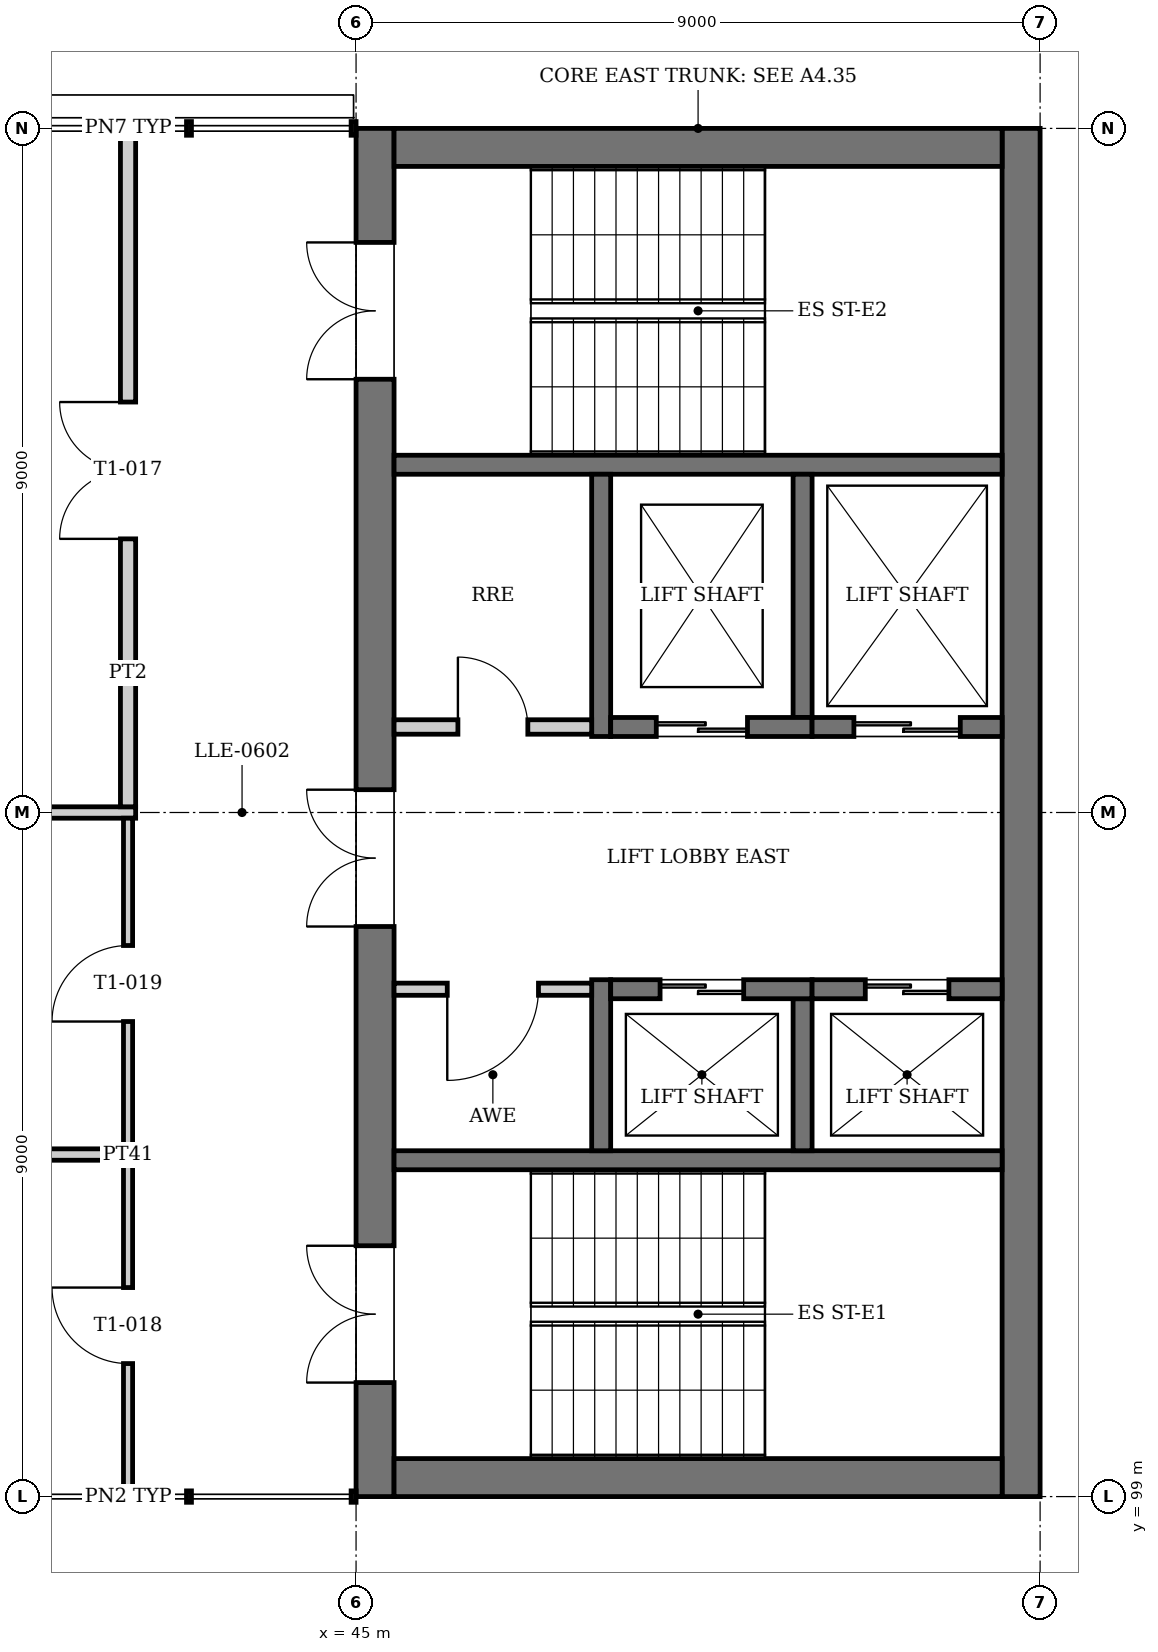
"""IFC4 building model, lengths in metres.
Left out: names, types, materials, properties, quantities, classifications, styles, units other than length and angle.
Written with IfcOpenShell. Run it as: python <this file> out.ifc"""

import sys

from ifc_helpers import new_model, si_unit, direction, frame, frame_2d, origin, place, context, subcontext, project, spatial, rectangle, extrude, element, fill, save


model = new_model("IFC4")
c1 = context("Model", 3, precision=1e-05, world=origin(), true_north=direction((0.0, 1.0)))
c2 = subcontext(c1, "Body", "Model", "MODEL_VIEW")
j1 = project(units=[si_unit("LENGTHUNIT", "METRE"), si_unit("PLANEANGLEUNIT", "RADIAN")], contexts=[c1])
p1 = place(None, origin())
s1 = spatial("IfcSite", under=j1, at=p1, CompositionType="ELEMENT")
p2 = place(p1, origin())
s2 = spatial("IfcBuilding", under=s1, at=p2, CompositionType="ELEMENT")
p3 = place(p2, frame((0.0, 0.0, 27.2)))
s3 = spatial("IfcBuildingStorey", under=s2, at=p3, CompositionType="ELEMENT", Elevation=27.2)
p4 = place(p3, frame((45.25, 99.0, 0.0), z_axis=(0.0, 0.0, 1.0), x_axis=(0.0, 1.0, 0.0)))
e1 = element("IfcWall", 1, at=p4, inside=s3, PredefinedType="SHEAR", context=c2, shape_type="SweptSolid", body=[
    extrude(rectangle(XDim=18.0, YDim=0.5, at=frame_2d((9.0, 0.0))), origin(), (0.0, 0.0, 1.0), 4.0),
])
p5 = place(p4, frame((1.5, 0.0, 0.0)))
e2 = element("IfcOpeningElement", 2, at=p5, cuts=e1, PredefinedType="OPENING", context=c2, shape_type="SweptSolid", body=[
    extrude(rectangle(XDim=1.8, YDim=2.1, at=frame_2d((0.9, 1.05))), frame((0.0, 0.26, 0.0), z_axis=(0.0, -1.0, 0.0), x_axis=(1.0, 0.0, 0.0)), (0.0, 0.0, 1.0), 0.52),
])
p6 = place(p4, frame((14.7, 0.0, 0.0)))
e3 = element("IfcOpeningElement", 3, at=p6, cuts=e1, PredefinedType="OPENING", context=c2, shape_type="SweptSolid", body=[
    extrude(rectangle(XDim=1.8, YDim=2.1, at=frame_2d((0.9, 1.05))), frame((0.0, 0.26, 0.0), z_axis=(0.0, -1.0, 0.0), x_axis=(1.0, 0.0, 0.0)), (0.0, 0.0, 1.0), 0.52),
])
p7 = place(p4, frame((7.5, 0.0, 0.0)))
e4 = element("IfcOpeningElement", 4, at=p7, cuts=e1, PredefinedType="OPENING", context=c2, shape_type="SweptSolid", body=[
    extrude(rectangle(XDim=1.8, YDim=2.1, at=frame_2d((0.9, 1.05))), frame((0.0, 0.26, 0.0), z_axis=(0.0, -1.0, 0.0), x_axis=(1.0, 0.0, 0.0)), (0.0, 0.0, 1.0), 0.52),
])
p8 = place(p3, frame((53.75, 99.0, 0.0), z_axis=(0.0, 0.0, 1.0), x_axis=(0.0, 1.0, 0.0)))
e5 = element("IfcWall", 5, at=p8, inside=s3, PredefinedType="SHEAR", context=c2, shape_type="SweptSolid", body=[
    extrude(rectangle(XDim=18.0, YDim=0.5, at=frame_2d((9.0, 0.0))), origin(), (0.0, 0.0, 1.0), 4.0),
])
for number, where, z_axis, x_axis in (
    (6, (45.5, 99.25, 0.0), (0.0, 0.0, 1.0), (1.0, 0.0, 0.0)),
    (7, (45.5, 116.75, 0.0), (0.0, 0.0, 1.0), (1.0, 0.0, 0.0)),
):
    element("IfcWall", number, at=place(p3, frame(where, z_axis=z_axis, x_axis=x_axis)), inside=s3, PredefinedType="SHEAR", context=c2, shape_type="SweptSolid", body=[
        extrude(rectangle(XDim=8.0, YDim=0.5, at=frame_2d((4.0, 0.0))), origin(), (0.0, 0.0, 1.0), 4.0),
    ])
for number, where, z_axis, x_axis in (
    (8, (45.5, 103.425, 0.0), (0.0, 0.0, 1.0), (1.0, 0.0, 0.0)),
    (9, (45.5, 112.575, 0.0), (0.0, 0.0, 1.0), (1.0, 0.0, 0.0)),
):
    element("IfcWall", number, at=place(p3, frame(where, z_axis=z_axis, x_axis=x_axis)), inside=s3, PredefinedType="SOLIDWALL", context=c2, shape_type="SweptSolid", body=[
        extrude(rectangle(XDim=8.0, YDim=0.25, at=frame_2d((4.0, 0.0))), origin(), (0.0, 0.0, 1.0), 3.75),
    ])
p9 = place(p3, frame((48.225, 103.55, 0.0), z_axis=(0.0, 0.0, 1.0), x_axis=(0.0, 1.0, 0.0)))
e10 = element("IfcWall", 10, at=p9, inside=s3, PredefinedType="SOLIDWALL", context=c2, shape_type="SweptSolid", body=[
    extrude(rectangle(XDim=2.25, YDim=0.25, at=frame_2d((1.125, 0.0))), origin(), (0.0, 0.0, 1.0), 4.0),
])
p10 = place(p3, frame((50.875, 103.55, 0.0), z_axis=(0.0, 0.0, 1.0), x_axis=(0.0, 1.0, 0.0)))
e11 = element("IfcWall", 11, at=p10, inside=s3, PredefinedType="SOLIDWALL", context=c2, shape_type="SweptSolid", body=[
    extrude(rectangle(XDim=2.0, YDim=0.25, at=frame_2d((1.0, 0.0))), origin(), (0.0, 0.0, 1.0), 4.0),
])
p11 = place(p3, frame((48.35, 105.675, 0.0), z_axis=(0.0, 0.0, 1.0), x_axis=(1.0, 0.0, 0.0)))
e12 = element("IfcWall", 12, at=p11, inside=s3, PredefinedType="SOLIDWALL", context=c2, shape_type="SweptSolid", body=[
    extrude(rectangle(XDim=2.65, YDim=0.25, at=frame_2d((1.325, 0.0))), origin(), (0.0, 0.0, 1.0), 4.0),
])
p12 = place(p11, frame((0.65, 0.0, 0.0)))
e13 = element("IfcOpeningElement", 13, at=p12, cuts=e12, PredefinedType="OPENING", context=c2, shape_type="SweptSolid", body=[
    extrude(rectangle(XDim=1.1, YDim=2.1, at=frame_2d((0.55, 1.05))), frame((0.0, 0.135, 0.0), z_axis=(0.0, -1.0, 0.0), x_axis=(1.0, 0.0, 0.0)), (0.0, 0.0, 1.0), 0.27),
])
p13 = place(p3, frame((51.0, 105.675, 0.0), z_axis=(0.0, 0.0, 1.0), x_axis=(1.0, 0.0, 0.0)))
e14 = element("IfcWall", 14, at=p13, inside=s3, PredefinedType="SOLIDWALL", context=c2, shape_type="SweptSolid", body=[
    extrude(rectangle(XDim=2.5, YDim=0.25, at=frame_2d((1.25, 0.0))), origin(), (0.0, 0.0, 1.0), 4.0),
])
p14 = place(p13, frame((0.7, 0.0, 0.0)))
e15 = element("IfcOpeningElement", 15, at=p14, cuts=e14, PredefinedType="OPENING", context=c2, shape_type="SweptSolid", body=[
    extrude(rectangle(XDim=1.1, YDim=2.1, at=frame_2d((0.55, 1.05))), frame((0.0, 0.135, 0.0), z_axis=(0.0, -1.0, 0.0), x_axis=(1.0, 0.0, 0.0)), (0.0, 0.0, 1.0), 0.27),
])
p15 = place(p3, frame((48.225, 109.0, 0.0), z_axis=(0.0, 0.0, 1.0), x_axis=(0.0, 1.0, 0.0)))
e16 = element("IfcWall", 16, at=p15, inside=s3, PredefinedType="SOLIDWALL", context=c2, shape_type="SweptSolid", body=[
    extrude(rectangle(XDim=3.45, YDim=0.25, at=frame_2d((1.725, 0.0))), origin(), (0.0, 0.0, 1.0), 4.0),
])
p16 = place(p3, frame((50.875, 109.25, 0.0), z_axis=(0.0, 0.0, 1.0), x_axis=(0.0, 1.0, 0.0)))
e17 = element("IfcWall", 17, at=p16, inside=s3, PredefinedType="SOLIDWALL", context=c2, shape_type="SweptSolid", body=[
    extrude(rectangle(XDim=3.2, YDim=0.25, at=frame_2d((1.6, 0.0))), origin(), (0.0, 0.0, 1.0), 4.0),
])
p17 = place(p3, frame((48.35, 109.125, 0.0), z_axis=(0.0, 0.0, 1.0), x_axis=(1.0, 0.0, 0.0)))
e18 = element("IfcWall", 18, at=p17, inside=s3, PredefinedType="SOLIDWALL", context=c2, shape_type="SweptSolid", body=[
    extrude(rectangle(XDim=2.65, YDim=0.25, at=frame_2d((1.325, 0.0))), origin(), (0.0, 0.0, 1.0), 4.0),
])
p18 = place(p17, frame((0.6, 0.0, 0.0)))
e19 = element("IfcOpeningElement", 19, at=p18, cuts=e18, PredefinedType="OPENING", context=c2, shape_type="SweptSolid", body=[
    extrude(rectangle(XDim=1.2, YDim=2.1, at=frame_2d((0.6, 1.05))), frame((0.0, 0.135, 0.0), z_axis=(0.0, -1.0, 0.0), x_axis=(1.0, 0.0, 0.0)), (0.0, 0.0, 1.0), 0.27),
])
p19 = place(p3, frame((51.0, 109.125, 0.0), z_axis=(0.0, 0.0, 1.0), x_axis=(1.0, 0.0, 0.0)))
e20 = element("IfcWall", 20, at=p19, inside=s3, PredefinedType="SOLIDWALL", context=c2, shape_type="SweptSolid", body=[
    extrude(rectangle(XDim=2.5, YDim=0.25, at=frame_2d((1.25, 0.0))), origin(), (0.0, 0.0, 1.0), 4.0),
])
p20 = place(p19, frame((0.55, 0.0, 0.0)))
e21 = element("IfcOpeningElement", 21, at=p20, cuts=e20, PredefinedType="OPENING", context=c2, shape_type="SweptSolid", body=[
    extrude(rectangle(XDim=1.4, YDim=2.4, at=frame_2d((0.7, 1.2))), frame((0.0, 0.135, 0.0), z_axis=(0.0, -1.0, 0.0), x_axis=(1.0, 0.0, 0.0)), (0.0, 0.0, 1.0), 0.27),
])
p21 = place(p3, frame((45.5, 105.675, 0.0), z_axis=(0.0, 0.0, 1.0), x_axis=(1.0, 0.0, 0.0)))
e22 = element("IfcWall", 22, at=p21, inside=s3, PredefinedType="PARTITIONING", context=c2, shape_type="SweptSolid", body=[
    extrude(rectangle(XDim=2.6, YDim=0.16, at=frame_2d((1.3, 0.0))), origin(), (0.0, 0.0, 1.0), 3.75),
])
p22 = place(p21, frame((0.7, 0.0, 0.0)))
e23 = element("IfcOpeningElement", 23, at=p22, cuts=e22, PredefinedType="OPENING", context=c2, shape_type="SweptSolid", body=[
    extrude(rectangle(XDim=1.2, YDim=2.1, at=frame_2d((0.6, 1.05))), frame((0.0, 0.09, 0.0), z_axis=(0.0, -1.0, 0.0), x_axis=(1.0, 0.0, 0.0)), (0.0, 0.0, 1.0), 0.18),
])
p23 = place(p3, frame((45.5, 109.125, 0.0), z_axis=(0.0, 0.0, 1.0), x_axis=(1.0, 0.0, 0.0)))
e24 = element("IfcWall", 24, at=p23, inside=s3, PredefinedType="PARTITIONING", context=c2, shape_type="SweptSolid", body=[
    extrude(rectangle(XDim=2.6, YDim=0.19, at=frame_2d((1.3, 0.0))), origin(), (0.0, 0.0, 1.0), 3.75),
])
p24 = place(p23, frame((0.84, 0.0, 0.0)))
e25 = element("IfcOpeningElement", 25, at=p24, cuts=e24, PredefinedType="OPENING", context=c2, shape_type="SweptSolid", body=[
    extrude(rectangle(XDim=0.92, YDim=2.1, at=frame_2d((0.46, 1.05))), frame((0.0, 0.105, 0.0), z_axis=(0.0, -1.0, 0.0), x_axis=(1.0, 0.0, 0.0)), (0.0, 0.0, 1.0), 0.21),
])
p25 = place(p3, frame((32.925, 103.5, 0.0), z_axis=(0.0, 0.0, 1.0), x_axis=(1.0, 0.0, 0.0)))
e26 = element("IfcWall", 26, at=p25, inside=s3, PredefinedType="PARTITIONING", context=c2, shape_type="SweptSolid", body=[
    extrude(rectangle(XDim=9.015, YDim=0.15, at=frame_2d((4.507, 0.0))), origin(), (0.0, 0.0, 1.0), 3.05),
])
p26 = place(p3, frame((32.925, 108.0, 0.0), z_axis=(0.0, 0.0, 1.0), x_axis=(1.0, 0.0, 0.0)))
e27 = element("IfcWall", 27, at=p26, inside=s3, PredefinedType="PARTITIONING", context=c2, shape_type="SweptSolid", body=[
    extrude(rectangle(XDim=9.175, YDim=0.15, at=frame_2d((4.587, 0.0))), origin(), (0.0, 0.0, 1.0), 3.05),
])
p27 = place(p3, frame((42.0, 99.075, 0.0), z_axis=(0.0, 0.0, 1.0), x_axis=(0.0, 1.0, 0.0)))
e28 = element("IfcWall", 28, at=p27, inside=s3, PredefinedType="PARTITIONING", context=c2, shape_type="SweptSolid", body=[
    extrude(rectangle(XDim=8.85, YDim=0.12, at=frame_2d((4.425, 0.0))), origin(), (0.0, 0.0, 1.0), 3.85),
])
p28 = place(p27, frame((1.675, 0.0, 0.0)))
e29 = element("IfcOpeningElement", 29, at=p28, cuts=e28, PredefinedType="OPENING", context=c2, shape_type="SweptSolid", body=[
    extrude(rectangle(XDim=1.0, YDim=2.1, at=frame_2d((0.5, 1.05))), frame((0.0, 0.07, 0.0), z_axis=(0.0, -1.0, 0.0), x_axis=(1.0, 0.0, 0.0)), (0.0, 0.0, 1.0), 0.14),
])
p29 = place(p27, frame((6.175, 0.0, 0.0)))
e30 = element("IfcOpeningElement", 30, at=p29, cuts=e28, PredefinedType="OPENING", context=c2, shape_type="SweptSolid", body=[
    extrude(rectangle(XDim=1.0, YDim=2.1, at=frame_2d((0.5, 1.05))), frame((0.0, 0.07, 0.0), z_axis=(0.0, -1.0, 0.0), x_axis=(1.0, 0.0, 0.0)), (0.0, 0.0, 1.0), 0.14),
])
p30 = place(p3, frame((42.0, 108.075, 0.0), z_axis=(0.0, 0.0, 1.0), x_axis=(0.0, 1.0, 0.0)))
e31 = element("IfcWall", 31, at=p30, inside=s3, PredefinedType="PARTITIONING", context=c2, shape_type="SweptSolid", body=[
    extrude(rectangle(XDim=8.835, YDim=0.2, at=frame_2d((4.417, 0.0))), origin(), (0.0, 0.0, 1.0), 3.85),
])
p31 = place(p30, frame((3.525, 0.0, 0.0)))
e32 = element("IfcOpeningElement", 32, at=p31, cuts=e31, PredefinedType="OPENING", context=c2, shape_type="SweptSolid", body=[
    extrude(rectangle(XDim=1.8, YDim=2.1, at=frame_2d((0.9, 1.05))), frame((0.0, 0.11, 0.0), z_axis=(0.0, -1.0, 0.0), x_axis=(1.0, 0.0, 0.0)), (0.0, 0.0, 1.0), 0.22),
])
p32 = place(p12, origin())
e33 = element("IfcDoor", 33, at=p32, inside=s3, OperationType="DOUBLE_DOOR_SLIDING", PredefinedType="DOOR", context=c2, shape_type="SweptSolid", body=[
    extrude(rectangle(XDim=1.1, YDim=2.1, at=frame_2d((0.55, 1.05))), frame((0.0, 0.025, 0.0), z_axis=(0.0, -1.0, 0.0), x_axis=(1.0, 0.0, 0.0)), (0.0, 0.0, 1.0), 0.05),
])
fill(e13, e33)
p33 = place(p14, origin())
e34 = element("IfcDoor", 34, at=p33, inside=s3, OperationType="DOUBLE_DOOR_SLIDING", PredefinedType="DOOR", context=c2, shape_type="SweptSolid", body=[
    extrude(rectangle(XDim=1.1, YDim=2.1, at=frame_2d((0.55, 1.05))), frame((0.0, 0.025, 0.0), z_axis=(0.0, -1.0, 0.0), x_axis=(1.0, 0.0, 0.0)), (0.0, 0.0, 1.0), 0.05),
])
fill(e15, e34)
p34 = place(p18, origin())
e35 = element("IfcDoor", 35, at=p34, inside=s3, OperationType="DOUBLE_DOOR_SLIDING", PredefinedType="DOOR", context=c2, shape_type="SweptSolid", body=[
    extrude(rectangle(XDim=1.2, YDim=2.1, at=frame_2d((0.6, 1.05))), frame((0.0, 0.025, 0.0), z_axis=(0.0, -1.0, 0.0), x_axis=(1.0, 0.0, 0.0)), (0.0, 0.0, 1.0), 0.05),
])
fill(e19, e35)
p35 = place(p20, origin())
e36 = element("IfcDoor", 36, at=p35, inside=s3, OperationType="DOUBLE_DOOR_SLIDING", PredefinedType="DOOR", context=c2, shape_type="SweptSolid", body=[
    extrude(rectangle(XDim=1.4, YDim=2.4, at=frame_2d((0.7, 1.2))), frame((0.0, 0.025, 0.0), z_axis=(0.0, -1.0, 0.0), x_axis=(1.0, 0.0, 0.0)), (0.0, 0.0, 1.0), 0.05),
])
fill(e21, e36)
p36 = place(p31, origin())
e37 = element("IfcDoor", 37, at=p36, inside=s3, OperationType="DOUBLE_DOOR_SINGLE_SWING", PredefinedType="DOOR", context=c2, shape_type="SweptSolid", body=[
    extrude(rectangle(XDim=1.8, YDim=2.1, at=frame_2d((0.9, 1.05))), frame((0.0, 0.025, 0.0), z_axis=(0.0, -1.0, 0.0), x_axis=(1.0, 0.0, 0.0)), (0.0, 0.0, 1.0), 0.05),
])
fill(e32, e37)
p37 = place(p28, origin())
e38 = element("IfcDoor", 38, at=p37, inside=s3, OperationType="SINGLE_SWING_RIGHT", PredefinedType="DOOR", context=c2, shape_type="SweptSolid", body=[
    extrude(rectangle(XDim=1.0, YDim=2.1, at=frame_2d((0.5, 1.05))), frame((0.0, 0.025, 0.0), z_axis=(0.0, -1.0, 0.0), x_axis=(1.0, 0.0, 0.0)), (0.0, 0.0, 1.0), 0.05),
])
fill(e29, e38)
p38 = place(p29, origin())
e39 = element("IfcDoor", 39, at=p38, inside=s3, OperationType="SINGLE_SWING_LEFT", PredefinedType="DOOR", context=c2, shape_type="SweptSolid", body=[
    extrude(rectangle(XDim=1.0, YDim=2.1, at=frame_2d((0.5, 1.05))), frame((0.0, 0.025, 0.0), z_axis=(0.0, -1.0, 0.0), x_axis=(1.0, 0.0, 0.0)), (0.0, 0.0, 1.0), 0.05),
])
fill(e30, e39)
p39 = place(p5, origin())
e40 = element("IfcDoor", 40, at=p39, inside=s3, OperationType="DOUBLE_DOOR_SINGLE_SWING", PredefinedType="DOOR", context=c2, shape_type="SweptSolid", body=[
    extrude(rectangle(XDim=1.8, YDim=2.1, at=frame_2d((0.9, 1.05))), frame((0.0, 0.025, 0.0), z_axis=(0.0, -1.0, 0.0), x_axis=(1.0, 0.0, 0.0)), (0.0, 0.0, 1.0), 0.05),
])
fill(e2, e40)
p40 = place(p6, origin())
e41 = element("IfcDoor", 41, at=p40, inside=s3, OperationType="DOUBLE_DOOR_SINGLE_SWING", PredefinedType="DOOR", context=c2, shape_type="SweptSolid", body=[
    extrude(rectangle(XDim=1.8, YDim=2.1, at=frame_2d((0.9, 1.05))), frame((0.0, 0.025, 0.0), z_axis=(0.0, -1.0, 0.0), x_axis=(1.0, 0.0, 0.0)), (0.0, 0.0, 1.0), 0.05),
])
fill(e3, e41)
p41 = place(p7, origin())
e42 = element("IfcDoor", 42, at=p41, inside=s3, OperationType="DOUBLE_DOOR_SINGLE_SWING", PredefinedType="DOOR", context=c2, shape_type="SweptSolid", body=[
    extrude(rectangle(XDim=1.8, YDim=2.1, at=frame_2d((0.9, 1.05))), frame((0.0, 0.025, 0.0), z_axis=(0.0, -1.0, 0.0), x_axis=(1.0, 0.0, 0.0)), (0.0, 0.0, 1.0), 0.05),
])
fill(e4, e42)
p42 = place(p22, frame((1.2, 0.0, 0.0), z_axis=(0.0, 0.0, 1.0), x_axis=(-1.0, 0.0, 0.0)))
e43 = element("IfcDoor", 43, at=p42, inside=s3, OperationType="SINGLE_SWING_RIGHT", PredefinedType="DOOR", context=c2, shape_type="SweptSolid", body=[
    extrude(rectangle(XDim=1.2, YDim=2.1, at=frame_2d((0.6, 1.05))), frame((0.0, 0.025, 0.0), z_axis=(0.0, -1.0, 0.0), x_axis=(1.0, 0.0, 0.0)), (0.0, 0.0, 1.0), 0.05),
])
fill(e23, e43)
p43 = place(p24, origin())
e44 = element("IfcDoor", 44, at=p43, inside=s3, OperationType="SINGLE_SWING_LEFT", PredefinedType="DOOR", context=c2, shape_type="SweptSolid", body=[
    extrude(rectangle(XDim=0.92, YDim=2.1, at=frame_2d((0.46, 1.05))), frame((0.0, 0.025, 0.0), z_axis=(0.0, -1.0, 0.0), x_axis=(1.0, 0.0, 0.0)), (0.0, 0.0, 1.0), 0.05),
])
fill(e25, e44)
save(model, sys.argv[1])
